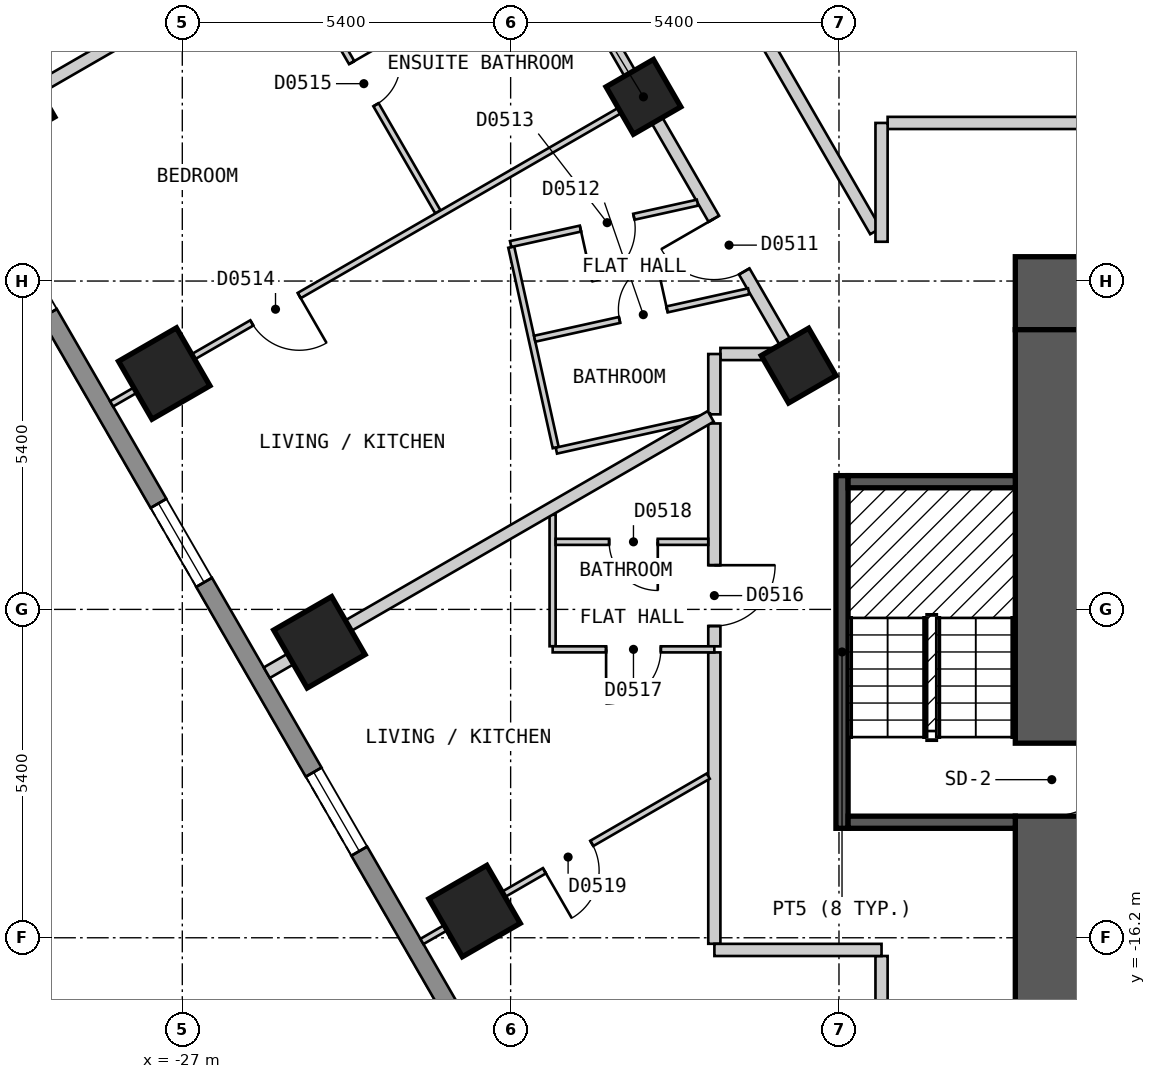
"""IFC4 building model, lengths in metres.
Left out: names, types, materials, properties, quantities, classifications, styles, units other than length and angle.
Written with IfcOpenShell. Run it as: python <this file> out.ifc"""

import sys

from ifc_helpers import new_model, si_unit, direction, frame, frame_2d, origin, origin_2d, place, context, subcontext, project, spatial, polyline, rectangle, outline, extrude, element, fill, save


model = new_model("IFC4")
c1 = context("Model", 3, precision=1e-05, world=origin(), true_north=direction((0.0, 1.0)))
c2 = subcontext(c1, "Body", "Model", "MODEL_VIEW")
j1 = project(units=[si_unit("LENGTHUNIT", "METRE"), si_unit("PLANEANGLEUNIT", "RADIAN")], contexts=[c1])
p1 = place(None, origin())
s1 = spatial("IfcSite", under=j1, at=p1, CompositionType="ELEMENT")
p2 = place(p1, origin())
s2 = spatial("IfcBuilding", under=s1, at=p2, CompositionType="ELEMENT")
p3 = place(p2, frame((0.0, 0.0, 50.4)))
s3 = spatial("IfcBuildingStorey", under=s2, at=p3, CompositionType="ELEMENT", Elevation=50.4)
for number, where, z_axis, x_axis in (
    (1, (-29.848, -2.5, 0.0), (0.0, 0.0, 1.0), (0.5, -0.866, 0.0)),
    (2, (-27.297, -6.921, 0.0), (0.0, 0.0, 1.0), (0.5, -0.866, 0.0)),
    (3, (-24.745, -11.341, 0.0), (0.0, 0.0, 1.0), (0.5, -0.866, 0.0)),
    (4, (-22.193, -15.761, 0.0), (0.0, 0.0, 1.0), (0.5, -0.866, 0.0)),
):
    element("IfcColumn", number, at=place(p3, frame(where, z_axis=z_axis, x_axis=x_axis)), inside=s3, PredefinedType="COLUMN", context=c2, shape_type="SweptSolid", body=[
        extrude(rectangle(XDim=1.1, YDim=1.1, at=origin_2d()), origin(), (0.0, 0.0, 1.0), 3.0),
    ])
for number, where, z_axis, x_axis in (
    (5, (-19.416, -2.371, 0.0), (0.0, 0.0, 1.0), (0.5, -0.866, 0.0)),
    (6, (-16.864, -6.791, 0.0), (0.0, 0.0, 1.0), (0.5, -0.866, 0.0)),
):
    element("IfcColumn", number, at=place(p3, frame(where, z_axis=z_axis, x_axis=x_axis)), inside=s3, PredefinedType="COLUMN", context=c2, shape_type="SweptSolid", body=[
        extrude(rectangle(XDim=0.9, YDim=0.9, at=origin_2d()), origin(), (0.0, 0.0, 1.0), 3.0),
    ])
p4 = place(p3, frame((-13.3, -5.6, 0.0), z_axis=(0.0, 0.0, 1.0), x_axis=(1.0, 0.0, 0.0)))
e7 = element("IfcWall", 7, at=p4, inside=s3, PredefinedType="SHEAR", context=c2, shape_type="SweptSolid", body=[
    extrude(rectangle(XDim=26.6, YDim=1.2, at=frame_2d((13.3, 0.0))), origin(), (0.0, 0.0, 1.0), 2.7),
])
p5 = place(p4, frame((23.65, 0.0, 0.0)))
e8 = element("IfcOpeningElement", 8, at=p5, cuts=e7, PredefinedType="OPENING", context=c2, shape_type="SweptSolid", body=[
    extrude(rectangle(XDim=1.2, YDim=2.1, at=frame_2d((0.6, 1.05))), frame((0.0, 0.61, 0.0), z_axis=(0.0, -1.0, 0.0), x_axis=(1.0, 0.0, 0.0)), (0.0, 0.0, 1.0), 1.22),
])
p6 = place(p3, frame((-12.7, -17.8, 0.0), z_axis=(0.0, 0.0, 1.0), x_axis=(0.0, 1.0, 0.0)))
e9 = element("IfcWall", 9, at=p6, inside=s3, PredefinedType="SHEAR", context=c2, shape_type="SweptSolid", body=[
    extrude(rectangle(XDim=11.6, YDim=1.2, at=frame_2d((5.8, 0.0))), origin(), (0.0, 0.0, 1.0), 2.7),
])
p7 = place(p6, frame((3.6, 0.0, 0.0)))
e10 = element("IfcOpeningElement", 10, at=p7, cuts=e9, PredefinedType="OPENING", context=c2, shape_type="SweptSolid", body=[
    extrude(rectangle(XDim=1.2, YDim=2.1, at=frame_2d((0.6, 1.05))), frame((0.0, 0.61, 0.0), z_axis=(0.0, -1.0, 0.0), x_axis=(1.0, 0.0, 0.0)), (0.0, 0.0, 1.0), 1.22),
])
p8 = place(p3, frame((-31.22, -2.425, 0.0), z_axis=(0.0, 0.0, 1.0), x_axis=(0.500001938803, -0.866024284413, 0.0)))
e11 = element("IfcWall", 11, at=p8, inside=s3, PredefinedType="SOLIDWALL", context=c2, shape_type="SweptSolid", body=[
    extrude(outline(polyline([(0.0, -0.15), (27.02, -0.15), (26.94, 0.15), (0.08, 0.15), (0.0, -0.15)])), origin(), (0.0, 0.0, 1.0), 2.7),
])
p9 = place(p8, frame((2.553, 0.0, 0.15)))
e12 = element("IfcOpeningElement", 12, at=p9, cuts=e11, PredefinedType="OPENING", context=c2, shape_type="SweptSolid", body=[
    extrude(rectangle(XDim=1.5, YDim=2.1, at=frame_2d((0.75, 1.05))), frame((0.0, 0.16, 0.0), z_axis=(0.0, -1.0, 0.0), x_axis=(1.0, 0.0, 0.0)), (0.0, 0.0, 1.0), 0.32),
])
p10 = place(p8, frame((7.657, 0.0, 0.15)))
e13 = element("IfcOpeningElement", 13, at=p10, cuts=e11, PredefinedType="OPENING", context=c2, shape_type="SweptSolid", body=[
    extrude(rectangle(XDim=1.5, YDim=2.1, at=frame_2d((0.75, 1.05))), frame((0.0, 0.16, 0.0), z_axis=(0.0, -1.0, 0.0), x_axis=(1.0, 0.0, 0.0)), (0.0, 0.0, 1.0), 0.32),
])
p11 = place(p8, frame((12.761, 0.0, 0.15)))
e14 = element("IfcOpeningElement", 14, at=p11, cuts=e11, PredefinedType="OPENING", context=c2, shape_type="SweptSolid", body=[
    extrude(rectangle(XDim=1.5, YDim=2.1, at=frame_2d((0.75, 1.05))), frame((0.0, 0.16, 0.0), z_axis=(0.0, -1.0, 0.0), x_axis=(1.0, 0.0, 0.0)), (0.0, 0.0, 1.0), 0.32),
])
p12 = place(p8, frame((17.865, 0.0, 0.15)))
e15 = element("IfcOpeningElement", 15, at=p12, cuts=e11, PredefinedType="OPENING", context=c2, shape_type="SweptSolid", body=[
    extrude(rectangle(XDim=1.5, YDim=2.1, at=frame_2d((0.75, 1.05))), frame((0.0, 0.16, 0.0), z_axis=(0.0, -1.0, 0.0), x_axis=(1.0, 0.0, 0.0)), (0.0, 0.0, 1.0), 0.32),
])
p13 = place(p8, frame((22.969, 0.0, 0.15)))
e16 = element("IfcOpeningElement", 16, at=p13, cuts=e11, PredefinedType="OPENING", context=c2, shape_type="SweptSolid", body=[
    extrude(rectangle(XDim=1.5, YDim=2.1, at=frame_2d((0.75, 1.05))), frame((0.0, 0.16, 0.0), z_axis=(0.0, -1.0, 0.0), x_axis=(1.0, 0.0, 0.0)), (0.0, 0.0, 1.0), 0.32),
])
p14 = place(p3, frame((-18.186, -0.101, 0.0), z_axis=(0.0, 0.0, 1.0), x_axis=(0.499997591167, -0.86602679452, 0.0)))
e17 = element("IfcWall", 17, at=p14, inside=s3, PredefinedType="PARTITIONING", context=c2, shape_type="SweptSolid", body=[
    extrude(rectangle(XDim=5.172, YDim=0.2, at=frame_2d((2.586, 0.0))), origin(), (0.0, 0.0, 1.0), 2.7),
])
p15 = place(p3, frame((-20.727, -0.101, 0.0), z_axis=(0.0, 0.0, 1.0), x_axis=(0.500065652488, -0.865987495984, 0.0)))
e18 = element("IfcWall", 18, at=p15, inside=s3, PredefinedType="PARTITIONING", context=c2, shape_type="SweptSolid", body=[
    extrude(rectangle(XDim=7.389, YDim=0.2, at=frame_2d((3.695, 0.0))), origin(), (0.0, 0.0, 1.0), 2.7),
])
p16 = place(p15, frame((4.937, 0.0, 0.0)))
e19 = element("IfcOpeningElement", 19, at=p16, cuts=e18, PredefinedType="OPENING", context=c2, shape_type="SweptSolid", body=[
    extrude(rectangle(XDim=1.0, YDim=2.1, at=frame_2d((0.5, 1.05))), frame((0.0, 0.11, 0.0), z_axis=(0.0, -1.0, 0.0), x_axis=(1.0, 0.0, 0.0)), (0.0, 0.0, 1.0), 0.22),
])
p17 = place(p3, frame((-15.5, -16.5, 0.0), z_axis=(0.0, 0.0, 1.0), x_axis=(0.0, -1.0, 0.0)))
e20 = element("IfcWall", 20, at=p17, inside=s3, PredefinedType="PARTITIONING", context=c2, shape_type="SweptSolid", body=[
    extrude(rectangle(XDim=1.175, YDim=0.2, at=frame_2d((0.587, 0.0))), origin(), (0.0, 0.0, 1.0), 2.7),
])
p18 = place(p3, frame((-18.25, -11.507, 0.0), z_axis=(0.0, 0.0, 1.0), x_axis=(0.0, -1.0, 0.0)))
e21 = element("IfcWall", 21, at=p18, inside=s3, PredefinedType="PARTITIONING", context=c2, shape_type="SweptSolid", body=[
    extrude(rectangle(XDim=4.792, YDim=0.2, at=frame_2d((2.396, 0.0))), origin(), (0.0, 0.0, 1.0), 2.7),
])
p19 = place(p3, frame((-18.15, -6.6, 0.0), z_axis=(0.0, 0.0, 1.0), x_axis=(1.0, 0.0, 0.0)))
e22 = element("IfcWall", 22, at=p19, inside=s3, PredefinedType="PARTITIONING", context=c2, shape_type="SweptSolid", body=[
    extrude(rectangle(XDim=1.176, YDim=0.2, at=frame_2d((0.588, 0.0))), origin(), (0.0, 0.0, 1.0), 2.7),
])
p20 = place(p3, frame((-18.249, -16.4, 0.0), z_axis=(0.0, 0.0, 1.0), x_axis=(1.0, 0.0, 0.0)))
e23 = element("IfcWall", 23, at=p20, inside=s3, PredefinedType="PARTITIONING", context=c2, shape_type="SweptSolid", body=[
    extrude(rectangle(XDim=2.749, YDim=0.2, at=frame_2d((1.375, 0.0))), origin(), (0.0, 0.0, 1.0), 2.7),
])
p21 = place(p3, frame((-15.4, -2.8, 0.0), z_axis=(0.0, 0.0, 1.0), x_axis=(1.0, 0.0, 0.0)))
e24 = element("IfcWall", 24, at=p21, inside=s3, PredefinedType="PARTITIONING", context=c2, shape_type="SweptSolid", body=[
    extrude(rectangle(XDim=8.372, YDim=0.2, at=frame_2d((4.186, 0.0))), origin(), (0.0, 0.0, 1.0), 2.7),
])
p22 = place(p3, frame((-15.5, -4.754, 0.0), z_axis=(0.0, 0.0, 1.0), x_axis=(0.0, 1.0, 0.0)))
e25 = element("IfcWall", 25, at=p22, inside=s3, PredefinedType="PARTITIONING", context=c2, shape_type="SweptSolid", body=[
    extrude(rectangle(XDim=1.954, YDim=0.2, at=frame_2d((0.977, 0.0))), origin(), (0.0, 0.0, 1.0), 2.7),
])
p23 = place(p3, frame((-18.25, -11.407, 0.0), z_axis=(0.0, 0.0, 1.0), x_axis=(0.0, 1.0, 0.0)))
e26 = element("IfcWall", 26, at=p23, inside=s3, PredefinedType="PARTITIONING", context=c2, shape_type="SweptSolid", body=[
    extrude(rectangle(XDim=3.665, YDim=0.2, at=frame_2d((1.833, 0.0))), origin(), (0.0, 0.0, 1.0), 2.7),
])
p24 = place(p23, frame((0.334, 0.0, 0.0)))
e27 = element("IfcOpeningElement", 27, at=p24, cuts=e26, PredefinedType="OPENING", context=c2, shape_type="SweptSolid", body=[
    extrude(rectangle(XDim=1.0, YDim=2.1, at=frame_2d((0.5, 1.05))), frame((0.0, 0.11, 0.0), z_axis=(0.0, -1.0, 0.0), x_axis=(1.0, 0.0, 0.0)), (0.0, 0.0, 1.0), 0.22),
])
p25 = place(p3, frame((-18.25, -7.592, 0.0), z_axis=(0.0, 0.0, 1.0), x_axis=(0.0, 1.0, 0.0)))
e28 = element("IfcWall", 28, at=p25, inside=s3, PredefinedType="PARTITIONING", context=c2, shape_type="SweptSolid", body=[
    extrude(rectangle(XDim=0.992, YDim=0.2, at=frame_2d((0.496, 0.0))), origin(), (0.0, 0.0, 1.0), 2.7),
])
p26 = place(p3, frame((-25.2, -0.101, 0.0), z_axis=(0.0, 0.0, 1.0), x_axis=(0.500099052605, -0.865968208183, 0.0)))
e29 = element("IfcWall", 29, at=p26, inside=s3, PredefinedType="PARTITIONING", context=c2, shape_type="SweptSolid", body=[
    extrude(rectangle(XDim=4.807, YDim=0.1, at=frame_2d((2.404, 0.0))), origin(), (0.0, 0.0, 1.0), 2.7),
])
p27 = place(p26, frame((1.971, 0.0, 0.0)))
e30 = element("IfcOpeningElement", 30, at=p27, cuts=e29, PredefinedType="OPENING", context=c2, shape_type="SweptSolid", body=[
    extrude(rectangle(XDim=0.8, YDim=2.1, at=frame_2d((0.4, 1.05))), frame((0.0, 0.06, 0.0), z_axis=(0.0, -1.0, 0.0), x_axis=(1.0, 0.0, 0.0)), (0.0, 0.0, 1.0), 0.12),
])
p28 = place(p3, frame((-21.59, -4.842, 0.0), z_axis=(0.0, 0.0, 1.0), x_axis=(0.216524734289, -0.976277132499, 0.0)))
e31 = element("IfcWall", 31, at=p28, inside=s3, PredefinedType="PARTITIONING", context=c2, shape_type="SweptSolid", body=[
    extrude(rectangle(XDim=3.377, YDim=0.1, at=frame_2d((1.688, 0.0))), origin(), (0.0, 0.0, 1.0), 2.7),
])
p29 = place(p3, frame((-20.91, -9.243, 0.0), z_axis=(0.0, 0.0, 1.0), x_axis=(0.0, -1.0, 0.0)))
e32 = element("IfcWall", 32, at=p29, inside=s3, PredefinedType="PARTITIONING", context=c2, shape_type="SweptSolid", body=[
    extrude(rectangle(XDim=2.163, YDim=0.1, at=frame_2d((1.082, 0.0))), origin(), (0.0, 0.0, 1.0), 2.7),
])
p30 = place(p3, frame((-20.86, -9.689, 0.0), z_axis=(0.0, 0.0, 1.0), x_axis=(1.0, 0.0, 0.0)))
e33 = element("IfcWall", 33, at=p30, inside=s3, PredefinedType="PARTITIONING", context=c2, shape_type="SweptSolid", body=[
    extrude(rectangle(XDim=2.51, YDim=0.1, at=frame_2d((1.255, 0.0))), origin(), (0.0, 0.0, 1.0), 2.7),
])
p31 = place(p30, frame((0.88, 0.0, 0.0)))
e34 = element("IfcOpeningElement", 34, at=p31, cuts=e33, PredefinedType="OPENING", context=c2, shape_type="SweptSolid", body=[
    extrude(rectangle(XDim=0.8, YDim=2.1, at=frame_2d((0.4, 1.05))), frame((0.0, 0.06, 0.0), z_axis=(0.0, -1.0, 0.0), x_axis=(1.0, 0.0, 0.0)), (0.0, 0.0, 1.0), 0.12),
])
p32 = place(p3, frame((-20.909, -11.457, 0.0), z_axis=(0.0, 0.0, 1.0), x_axis=(1.0, 0.0, 0.0)))
e35 = element("IfcWall", 35, at=p32, inside=s3, PredefinedType="PARTITIONING", context=c2, shape_type="SweptSolid", body=[
    extrude(rectangle(XDim=2.659, YDim=0.1, at=frame_2d((1.33, 0.0))), origin(), (0.0, 0.0, 1.0), 2.7),
])
p33 = place(p32, frame((0.879, 0.0, 0.0)))
e36 = element("IfcOpeningElement", 36, at=p33, cuts=e35, PredefinedType="OPENING", context=c2, shape_type="SweptSolid", body=[
    extrude(rectangle(XDim=0.9, YDim=2.1, at=frame_2d((0.45, 1.05))), frame((0.0, 0.06, 0.0), z_axis=(0.0, -1.0, 0.0), x_axis=(1.0, 0.0, 0.0)), (0.0, 0.0, 1.0), 0.12),
])
p34 = place(p3, frame((-20.848, -8.189, 0.0), z_axis=(0.0, 0.0, 1.0), x_axis=(0.976266547712, 0.216572453971, 0.0)))
e37 = element("IfcWall", 37, at=p34, inside=s3, PredefinedType="PARTITIONING", context=c2, shape_type="SweptSolid", body=[
    extrude(rectangle(XDim=2.6, YDim=0.1, at=frame_2d((1.3, 0.0))), origin(), (0.0, 0.0, 1.0), 2.7),
])
p35 = place(p3, frame((-21.205, -6.349, 0.0), z_axis=(0.0, 0.0, 1.0), x_axis=(0.976315944397, 0.216349663084, 0.0)))
e38 = element("IfcWall", 38, at=p35, inside=s3, PredefinedType="PARTITIONING", context=c2, shape_type="SweptSolid", body=[
    extrude(rectangle(XDim=3.605, YDim=0.1, at=frame_2d((1.803, 0.0))), origin(), (0.0, 0.0, 1.0), 2.7),
])
p36 = place(p35, frame((1.43, 0.0, 0.0)))
e39 = element("IfcOpeningElement", 39, at=p36, cuts=e38, PredefinedType="OPENING", context=c2, shape_type="SweptSolid", body=[
    extrude(rectangle(XDim=0.8, YDim=2.1, at=frame_2d((0.4, 1.05))), frame((0.0, 0.06, 0.0), z_axis=(0.0, -1.0, 0.0), x_axis=(1.0, 0.0, 0.0)), (0.0, 0.0, 1.0), 0.12),
])
p37 = place(p3, frame((-21.6, -4.792, 0.0), z_axis=(0.0, 0.0, 1.0), x_axis=(0.976320106661, 0.216330879278, 0.0)))
e40 = element("IfcWall", 40, at=p37, inside=s3, PredefinedType="PARTITIONING", context=c2, shape_type="SweptSolid", body=[
    extrude(rectangle(XDim=3.147, YDim=0.1, at=frame_2d((1.574, 0.0))), origin(), (0.0, 0.0, 1.0), 2.7),
])
p38 = place(p37, frame((1.176, 0.0, 0.0)))
e41 = element("IfcOpeningElement", 41, at=p38, cuts=e40, PredefinedType="OPENING", context=c2, shape_type="SweptSolid", body=[
    extrude(rectangle(XDim=0.9, YDim=2.1, at=frame_2d((0.45, 1.05))), frame((0.0, 0.06, 0.0), z_axis=(0.0, -1.0, 0.0), x_axis=(1.0, 0.0, 0.0)), (0.0, 0.0, 1.0), 0.12),
])
p39 = place(p3, frame((-23.059, -16.261, 0.0), z_axis=(0.0, 0.0, 1.0), x_axis=(0.866004639177, 0.500035963631, 0.0)))
e42 = element("IfcWall", 42, at=p39, inside=s3, PredefinedType="PARTITIONING", context=c2, shape_type="SweptSolid", body=[
    extrude(rectangle(XDim=5.438, YDim=0.1, at=frame_2d((2.719, 0.0))), origin(), (0.0, 0.0, 1.0), 2.7),
])
p40 = place(p39, frame((2.326, 0.0, 0.0)))
e43 = element("IfcOpeningElement", 43, at=p40, cuts=e42, PredefinedType="OPENING", context=c2, shape_type="SweptSolid", body=[
    extrude(rectangle(XDim=0.9, YDim=2.1, at=frame_2d((0.45, 1.05))), frame((0.0, 0.06, 0.0), z_axis=(0.0, -1.0, 0.0), x_axis=(1.0, 0.0, 0.0)), (0.0, 0.0, 1.0), 0.12),
])
p41 = place(p3, frame((-28.163, -7.42, 0.0), z_axis=(0.0, 0.0, 1.0), x_axis=(0.866065245018, 0.499930986609, 0.0)))
e44 = element("IfcWall", 44, at=p41, inside=s3, PredefinedType="PARTITIONING", context=c2, shape_type="SweptSolid", body=[
    extrude(rectangle(XDim=10.0, YDim=0.1, at=frame_2d((5.0, 0.0))), origin(), (0.0, 0.0, 1.0), 2.7),
])
p42 = place(p41, frame((2.663, 0.0, 0.0)))
e45 = element("IfcOpeningElement", 45, at=p42, cuts=e44, PredefinedType="OPENING", context=c2, shape_type="SweptSolid", body=[
    extrude(rectangle(XDim=0.9, YDim=2.1, at=frame_2d((0.45, 1.05))), frame((0.0, 0.06, 0.0), z_axis=(0.0, -1.0, 0.0), x_axis=(1.0, 0.0, 0.0)), (0.0, 0.0, 1.0), 0.12),
])
p43 = place(p3, frame((-30.715, -3.0, 0.0), z_axis=(0.0, 0.0, 1.0), x_axis=(0.86609140076, 0.499885672459, 0.0)))
e46 = element("IfcWall", 46, at=p43, inside=s3, PredefinedType="PARTITIONING", context=c2, shape_type="SweptSolid", body=[
    extrude(rectangle(XDim=6.0, YDim=0.2, at=frame_2d((3.0, 0.0))), origin(), (0.0, 0.0, 1.0), 2.7),
])
p44 = place(p3, frame((-25.61, -11.841, 0.0), z_axis=(0.0, 0.0, 1.0), x_axis=(0.866004715254, 0.500035831874, 0.0)))
e47 = element("IfcWall", 47, at=p44, inside=s3, PredefinedType="PARTITIONING", context=c2, shape_type="SweptSolid", body=[
    extrude(rectangle(XDim=8.43, YDim=0.2, at=frame_2d((4.215, 0.0))), origin(), (0.0, 0.0, 1.0), 2.7),
])
p45 = place(p3, frame((-16.15, -14.4, 0.0), z_axis=(0.0, 0.0, 1.0), x_axis=(0.0, 1.0, 0.0)))
e48 = element("IfcWall", 48, at=p45, inside=s3, PredefinedType="SOLIDWALL", context=c2, shape_type="SweptSolid", body=[
    extrude(rectangle(XDim=5.8, YDim=0.2, at=frame_2d((2.9, 0.0))), origin(), (0.0, 0.0, 1.0), 2.7),
])
for number, where, z_axis, x_axis in (
    (49, (-16.05, -14.3, 0.0), (0.0, 0.0, 1.0), (1.0, 0.0, 0.0)),
    (50, (-16.05, -8.7, 0.0), (0.0, 0.0, 1.0), (1.0, 0.0, 0.0)),
):
    element("IfcWall", number, at=place(p3, frame(where, z_axis=z_axis, x_axis=x_axis)), inside=s3, PredefinedType="SOLIDWALL", context=c2, shape_type="SweptSolid", body=[
        extrude(rectangle(XDim=2.75, YDim=0.2, at=frame_2d((1.375, 0.0))), origin(), (0.0, 0.0, 1.0), 2.7),
    ])
p46 = place(p10, origin())
e51 = element("IfcWindow", 51, at=p46, inside=s3, PartitioningType="SINGLE_PANEL", PredefinedType="WINDOW", context=c2, shape_type="SweptSolid", body=[
    extrude(rectangle(XDim=1.5, YDim=2.1, at=frame_2d((0.75, 1.05))), frame((0.0, 0.03, 0.0), z_axis=(0.0, -1.0, 0.0), x_axis=(1.0, 0.0, 0.0)), (0.0, 0.0, 1.0), 0.06),
])
fill(e13, e51)
p47 = place(p11, origin())
e52 = element("IfcWindow", 52, at=p47, inside=s3, PartitioningType="SINGLE_PANEL", PredefinedType="WINDOW", context=c2, shape_type="SweptSolid", body=[
    extrude(rectangle(XDim=1.5, YDim=2.1, at=frame_2d((0.75, 1.05))), frame((0.0, 0.03, 0.0), z_axis=(0.0, -1.0, 0.0), x_axis=(1.0, 0.0, 0.0)), (0.0, 0.0, 1.0), 0.06),
])
fill(e14, e52)
p48 = place(p16, origin())
e53 = element("IfcDoor", 53, at=p48, inside=s3, OperationType="SINGLE_SWING_LEFT", PredefinedType="DOOR", context=c2, shape_type="SweptSolid", body=[
    extrude(rectangle(XDim=1.0, YDim=2.1, at=frame_2d((0.5, 1.05))), frame((0.0, 0.025, 0.0), z_axis=(0.0, -1.0, 0.0), x_axis=(1.0, 0.0, 0.0)), (0.0, 0.0, 1.0), 0.05),
])
fill(e19, e53)
p49 = place(p36, origin())
e54 = element("IfcDoor", 54, at=p49, inside=s3, OperationType="SINGLE_SWING_RIGHT", PredefinedType="DOOR", context=c2, shape_type="SweptSolid", body=[
    extrude(rectangle(XDim=0.8, YDim=2.1, at=frame_2d((0.4, 1.05))), frame((0.0, 0.025, 0.0), z_axis=(0.0, -1.0, 0.0), x_axis=(1.0, 0.0, 0.0)), (0.0, 0.0, 1.0), 0.05),
])
fill(e39, e54)
p50 = place(p38, origin())
e55 = element("IfcDoor", 55, at=p50, inside=s3, OperationType="SINGLE_SWING_LEFT", PredefinedType="DOOR", context=c2, shape_type="SweptSolid", body=[
    extrude(rectangle(XDim=0.9, YDim=2.1, at=frame_2d((0.45, 1.05))), frame((0.0, 0.025, 0.0), z_axis=(0.0, -1.0, 0.0), x_axis=(1.0, 0.0, 0.0)), (0.0, 0.0, 1.0), 0.05),
])
fill(e41, e55)
p51 = place(p42, origin())
e56 = element("IfcDoor", 56, at=p51, inside=s3, OperationType="SINGLE_SWING_RIGHT", PredefinedType="DOOR", context=c2, shape_type="SweptSolid", body=[
    extrude(rectangle(XDim=0.9, YDim=2.1, at=frame_2d((0.45, 1.05))), frame((0.0, 0.025, 0.0), z_axis=(0.0, -1.0, 0.0), x_axis=(1.0, 0.0, 0.0)), (0.0, 0.0, 1.0), 0.05),
])
fill(e45, e56)
p52 = place(p27, origin())
e57 = element("IfcDoor", 57, at=p52, inside=s3, OperationType="SINGLE_SWING_LEFT", PredefinedType="DOOR", context=c2, shape_type="SweptSolid", body=[
    extrude(rectangle(XDim=0.8, YDim=2.1, at=frame_2d((0.4, 1.05))), frame((0.0, 0.025, 0.0), z_axis=(0.0, -1.0, 0.0), x_axis=(1.0, 0.0, 0.0)), (0.0, 0.0, 1.0), 0.05),
])
fill(e30, e57)
p53 = place(p24, origin())
e58 = element("IfcDoor", 58, at=p53, inside=s3, OperationType="SINGLE_SWING_RIGHT", PredefinedType="DOOR", context=c2, shape_type="SweptSolid", body=[
    extrude(rectangle(XDim=1.0, YDim=2.1, at=frame_2d((0.5, 1.05))), frame((0.0, 0.025, 0.0), z_axis=(0.0, -1.0, 0.0), x_axis=(1.0, 0.0, 0.0)), (0.0, 0.0, 1.0), 0.05),
])
fill(e27, e58)
p54 = place(p33, origin())
e59 = element("IfcDoor", 59, at=p54, inside=s3, OperationType="SINGLE_SWING_LEFT", PredefinedType="DOOR", context=c2, shape_type="SweptSolid", body=[
    extrude(rectangle(XDim=0.9, YDim=2.1, at=frame_2d((0.45, 1.05))), frame((0.0, 0.025, 0.0), z_axis=(0.0, -1.0, 0.0), x_axis=(1.0, 0.0, 0.0)), (0.0, 0.0, 1.0), 0.05),
])
fill(e36, e59)
p55 = place(p31, origin())
e60 = element("IfcDoor", 60, at=p55, inside=s3, OperationType="SINGLE_SWING_RIGHT", PredefinedType="DOOR", context=c2, shape_type="SweptSolid", body=[
    extrude(rectangle(XDim=0.8, YDim=2.1, at=frame_2d((0.4, 1.05))), frame((0.0, 0.025, 0.0), z_axis=(0.0, -1.0, 0.0), x_axis=(1.0, 0.0, 0.0)), (0.0, 0.0, 1.0), 0.05),
])
fill(e34, e60)
p56 = place(p40, origin())
e61 = element("IfcDoor", 61, at=p56, inside=s3, OperationType="SINGLE_SWING_LEFT", PredefinedType="DOOR", context=c2, shape_type="SweptSolid", body=[
    extrude(rectangle(XDim=0.9, YDim=2.1, at=frame_2d((0.45, 1.05))), frame((0.0, 0.025, 0.0), z_axis=(0.0, -1.0, 0.0), x_axis=(1.0, 0.0, 0.0)), (0.0, 0.0, 1.0), 0.05),
])
fill(e43, e61)
p57 = place(p7, origin())
e62 = element("IfcDoor", 62, at=p57, inside=s3, OperationType="SINGLE_SWING_RIGHT", PredefinedType="DOOR", context=c2, shape_type="SweptSolid", body=[
    extrude(rectangle(XDim=1.2, YDim=2.1, at=frame_2d((0.6, 1.05))), frame((0.0, 0.025, 0.0), z_axis=(0.0, -1.0, 0.0), x_axis=(1.0, 0.0, 0.0)), (0.0, 0.0, 1.0), 0.05),
])
fill(e10, e62)
save(model, sys.argv[1])
